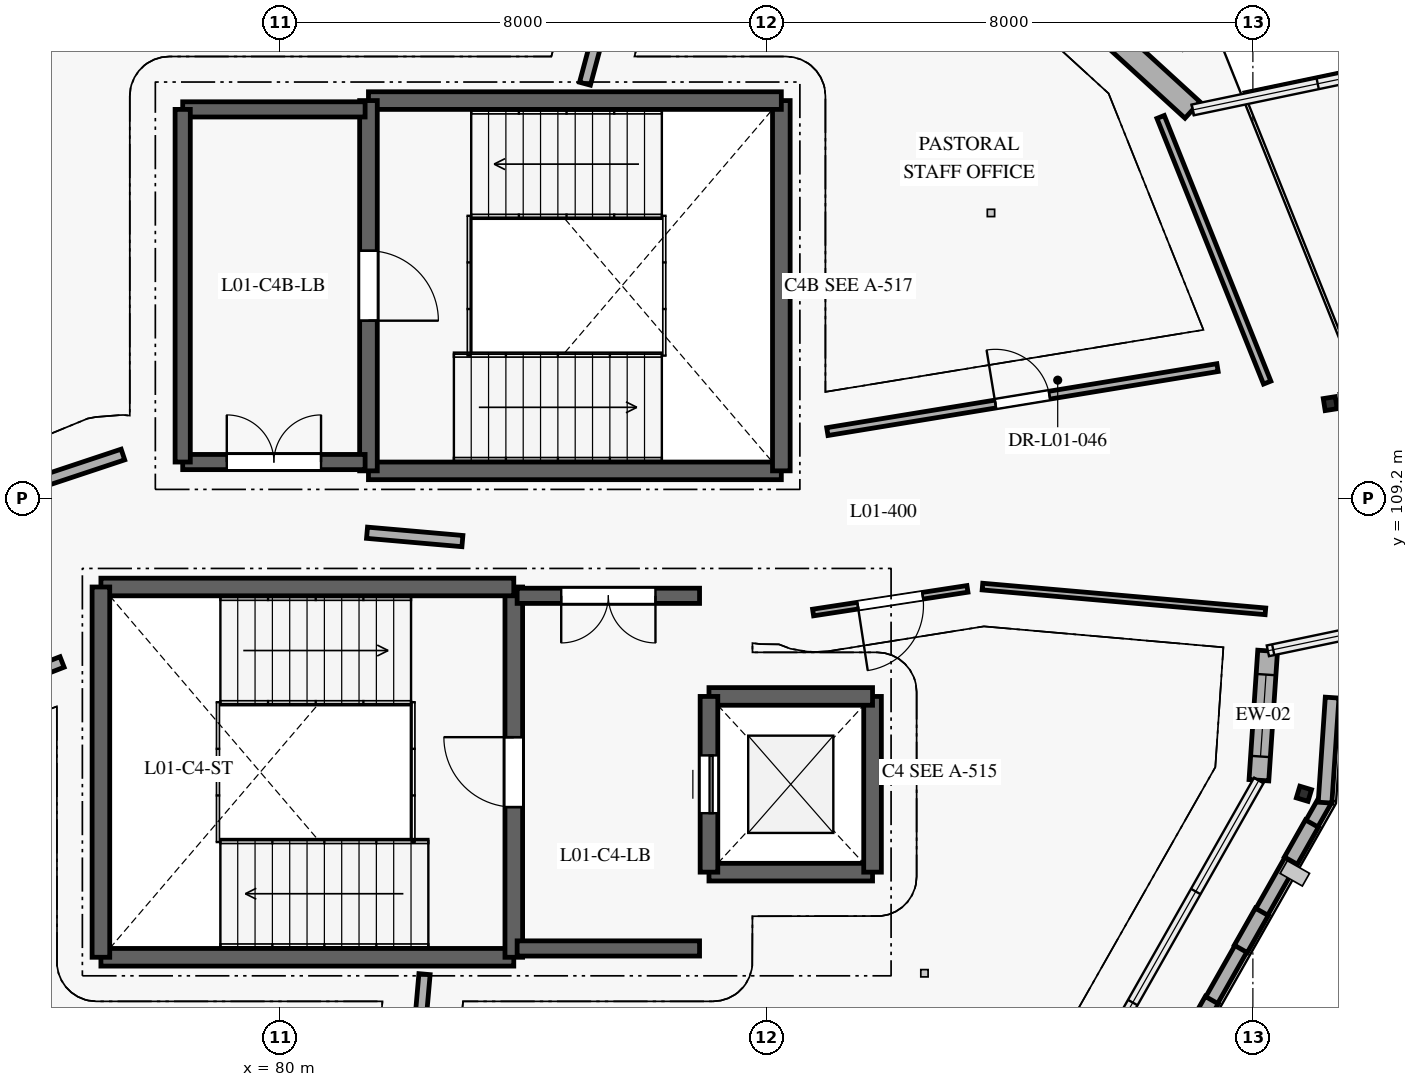
"""IFC4 building model, lengths in metres.
Left out: names, types, materials, properties, quantities, classifications, styles, units other than length and angle.
Written with IfcOpenShell. Run it as: python <this file> out.ifc"""

import sys

from ifc_helpers import new_model, si_unit, direction, frame, frame_2d, origin, origin_2d, place, context, subcontext, project, spatial, rectangle, hollow_rectangle, extrude, element, fill, save


model = new_model("IFC4")
c1 = context("Model", 3, precision=1e-05, world=origin(), true_north=direction((0.0, 1.0)))
c2 = subcontext(c1, "Body", "Model", "MODEL_VIEW")
j1 = project(units=[si_unit("LENGTHUNIT", "METRE"), si_unit("PLANEANGLEUNIT", "RADIAN")], contexts=[c1])
p1 = place(None, origin())
s1 = spatial("IfcSite", under=j1, at=p1, CompositionType="ELEMENT")
p2 = place(p1, origin())
s2 = spatial("IfcBuilding", under=s1, at=p2, CompositionType="ELEMENT")
p3 = place(p2, frame((0.0, 0.0, 4.2)))
s3 = spatial("IfcBuildingStorey", under=s2, at=p3, CompositionType="ELEMENT", Elevation=4.2)
for number, where, z_axis, x_axis in (
    (1, (97.272, 110.76, 0.0), (0.0, 0.0, 1.0), (-0.156, 0.988, 0.0)),
    (2, (96.84, 104.344, 0.0), (0.0, 0.0, 1.0), (0.288, 0.958, 0.0)),
):
    element("IfcColumn", number, at=place(p3, frame(where, z_axis=z_axis, x_axis=x_axis)), inside=s3, PredefinedType="COLUMN", context=c2, shape_type="SweptSolid", body=[
        extrude(hollow_rectangle(XDim=0.2, YDim=0.2, WallThickness=0.012, InnerFilletRadius=0.012, OuterFilletRadius=0.019, at=origin_2d()), origin(), (0.0, 0.0, 1.0), 4.2),
    ])
p4 = place(p3, frame((89.75, 120.396, 0.0), z_axis=(0.0, 0.0, 1.0), x_axis=(0.738102453677, -0.674688645136, 0.0)))
e3 = element("IfcWall", 3, at=p4, inside=s3, PredefinedType="SOLIDWALL", context=c2, shape_type="SweptSolid", body=[
    extrude(rectangle(XDim=7.122, YDim=0.365, at=frame_2d((3.561, 0.0))), origin(), (0.0, 0.0, 1.0), 3.94),
])
p5 = place(p4, frame((0.556, 0.0, 0.85)))
e4 = element("IfcOpeningElement", 4, at=p5, cuts=e3, PredefinedType="OPENING", context=c2, shape_type="SweptSolid", body=[
    extrude(rectangle(XDim=2.45, YDim=1.4, at=frame_2d((1.225, 0.7))), frame((0.0, 0.192, 0.0), z_axis=(0.0, -1.0, 0.0), x_axis=(1.0, 0.0, 0.0)), (0.0, 0.0, 1.0), 0.385),
])
p6 = place(p4, frame((3.911, 0.0, 0.85)))
e5 = element("IfcOpeningElement", 5, at=p6, cuts=e3, PredefinedType="OPENING", context=c2, shape_type="SweptSolid", body=[
    extrude(rectangle(XDim=0.85, YDim=1.4, at=frame_2d((0.425, 0.7))), frame((0.0, 0.192, 0.0), z_axis=(0.0, -1.0, 0.0), x_axis=(1.0, 0.0, 0.0)), (0.0, 0.0, 1.0), 0.385),
])
p7 = place(p3, frame((96.243, 106.695, 0.0), z_axis=(0.0, 0.0, 1.0), x_axis=(-0.067309145793, -0.997732167915, 0.0)))
e6 = element("IfcWall", 6, at=p7, inside=s3, PredefinedType="SOLIDWALL", context=c2, shape_type="SweptSolid", body=[
    extrude(rectangle(XDim=2.133, YDim=0.325, at=frame_2d((1.066, 0.0))), origin(), (0.0, 0.0, 1.0), 3.94),
])
p8 = place(p7, frame((0.391, 0.0, 0.85)))
e7 = element("IfcOpeningElement", 7, at=p8, cuts=e6, PredefinedType="OPENING", context=c2, shape_type="SweptSolid", body=[
    extrude(rectangle(XDim=1.35, YDim=1.6, at=frame_2d((0.675, 0.8))), frame((0.0, 0.172, 0.0), z_axis=(0.0, -1.0, 0.0), x_axis=(1.0, 0.0, 0.0)), (0.0, 0.0, 1.0), 0.345),
])
p9 = place(p3, frame((93.915, 98.469, 0.0), z_axis=(0.0, 0.0, 1.0), x_axis=(0.493497861667, 0.869747009498, 0.0)))
e8 = element("IfcWall", 8, at=p9, inside=s3, PredefinedType="ELEMENTEDWALL", context=c2, shape_type="SweptSolid", body=[
    extrude(rectangle(XDim=6.676, YDim=0.225, at=frame_2d((3.338, 0.0))), origin(), (0.0, 0.0, 1.0), 1.09),
])
for number, where, z_axis, x_axis in (
    (9, (94.978, 100.341, 1.09), (0.0, 0.0, 1.0), (0.493, 0.87, 0.0)),
    (10, (95.801, 101.793, 1.09), (0.0, 0.0, 1.0), (0.494, 0.87, 0.0)),
):
    element("IfcWall", number, at=place(p3, frame(where, z_axis=z_axis, x_axis=x_axis)), inside=s3, PredefinedType="ELEMENTEDWALL", context=c2, shape_type="SweptSolid", body=[
        extrude(rectangle(XDim=0.701, YDim=0.245, at=frame_2d((0.351, 0.0))), origin(), (0.0, 0.0, 1.0), 2.85),
    ])
p10 = place(p3, frame((96.625, 103.244, 1.09), z_axis=(0.0, 0.0, 1.0), x_axis=(0.49339908657, 0.869803047461, 0.0)))
e11 = element("IfcWall", 11, at=p10, inside=s3, PredefinedType="ELEMENTEDWALL", context=c2, shape_type="SweptSolid", body=[
    extrude(rectangle(XDim=0.701, YDim=0.245, at=frame_2d((0.351, 0.0))), origin(), (0.0, 0.0, 1.0), 2.85),
])
p11 = place(p3, frame((97.187, 104.198, 0.0), z_axis=(0.0, 0.0, 1.0), x_axis=(0.067258320943, 0.997735595368, 0.0)))
e12 = element("IfcWall", 12, at=p11, inside=s3, PredefinedType="ELEMENTEDWALL", context=c2, shape_type="SweptSolid", body=[
    extrude(rectangle(XDim=1.731, YDim=0.225, at=frame_2d((0.866, 0.0))), origin(), (0.0, 0.0, 1.0), 1.09),
])
p12 = place(p3, frame((77.055, 101.655, 0.0), z_axis=(0.0, 0.0, 1.0), x_axis=(1.0, 0.0, 0.0)))
e13 = element("IfcWall", 13, at=p12, inside=s3, PredefinedType="SHEAR", context=c2, shape_type="SweptSolid", body=[
    extrude(rectangle(XDim=6.79, YDim=0.29, at=frame_2d((3.395, 0.0))), origin(), (0.0, 0.0, 1.0), 3.95),
])
p13 = place(p3, frame((83.845, 101.655, 0.0), z_axis=(0.0, 0.0, 1.0), x_axis=(0.0, 1.0, 0.0)))
e14 = element("IfcWall", 14, at=p13, inside=s3, PredefinedType="SHEAR", context=c2, shape_type="SweptSolid", body=[
    extrude(rectangle(XDim=6.09, YDim=0.29, at=frame_2d((3.045, 0.0))), origin(), (0.0, 0.0, 1.0), 3.95),
])
p14 = place(p13, frame((2.47, 0.0, 0.0)))
e15 = element("IfcOpeningElement", 15, at=p14, cuts=e14, PredefinedType="OPENING", context=c2, shape_type="SweptSolid", body=[
    extrude(rectangle(XDim=1.15, YDim=2.1, at=frame_2d((0.575, 1.05))), frame((0.0, 0.155, 0.0), z_axis=(0.0, -1.0, 0.0), x_axis=(1.0, 0.0, 0.0)), (0.0, 0.0, 1.0), 0.31),
])
p15 = place(p3, frame((83.845, 107.745, 0.0), z_axis=(0.0, 0.0, 1.0), x_axis=(-1.0, 0.0, 0.0)))
e16 = element("IfcWall", 16, at=p15, inside=s3, PredefinedType="SHEAR", context=c2, shape_type="SweptSolid", body=[
    extrude(rectangle(XDim=6.79, YDim=0.29, at=frame_2d((3.395, 0.0))), origin(), (0.0, 0.0, 1.0), 3.95),
])
p16 = place(p3, frame((77.055, 107.745, 0.0), z_axis=(0.0, 0.0, 1.0), x_axis=(0.0, -1.0, 0.0)))
e17 = element("IfcWall", 17, at=p16, inside=s3, PredefinedType="SHEAR", context=c2, shape_type="SweptSolid", body=[
    extrude(rectangle(XDim=6.09, YDim=0.29, at=frame_2d((3.045, 0.0))), origin(), (0.0, 0.0, 1.0), 3.95),
])
p17 = place(p3, frame((87.055, 103.055, 0.0), z_axis=(0.0, 0.0, 1.0), x_axis=(1.0, 0.0, 0.0)))
e18 = element("IfcWall", 18, at=p17, inside=s3, PredefinedType="SHEAR", context=c2, shape_type="SweptSolid", body=[
    extrude(rectangle(XDim=2.69, YDim=0.29, at=frame_2d((1.345, 0.0))), origin(), (0.0, 0.0, 1.0), 3.95),
])
p18 = place(p3, frame((89.745, 103.055, 0.0), z_axis=(0.0, 0.0, 1.0), x_axis=(0.0, 1.0, 0.0)))
e19 = element("IfcWall", 19, at=p18, inside=s3, PredefinedType="SHEAR", context=c2, shape_type="SweptSolid", body=[
    extrude(rectangle(XDim=2.89, YDim=0.29, at=frame_2d((1.445, 0.0))), origin(), (0.0, 0.0, 1.0), 3.95),
])
p19 = place(p3, frame((89.745, 105.945, 0.0), z_axis=(0.0, 0.0, 1.0), x_axis=(-1.0, 0.0, 0.0)))
e20 = element("IfcWall", 20, at=p19, inside=s3, PredefinedType="SHEAR", context=c2, shape_type="SweptSolid", body=[
    extrude(rectangle(XDim=2.69, YDim=0.29, at=frame_2d((1.345, 0.0))), origin(), (0.0, 0.0, 1.0), 3.95),
])
p20 = place(p3, frame((87.055, 105.945, 0.0), z_axis=(0.0, 0.0, 1.0), x_axis=(0.0, -1.0, 0.0)))
e21 = element("IfcWall", 21, at=p20, inside=s3, PredefinedType="SHEAR", context=c2, shape_type="SweptSolid", body=[
    extrude(rectangle(XDim=2.89, YDim=0.29, at=frame_2d((1.445, 0.0))), origin(), (0.0, 0.0, 1.0), 3.95),
])
p21 = place(p20, frame((0.97, 0.0, 0.0)))
e22 = element("IfcOpeningElement", 22, at=p21, cuts=e21, PredefinedType="OPENING", context=c2, shape_type="SweptSolid", body=[
    extrude(rectangle(XDim=0.95, YDim=2.1, at=frame_2d((0.475, 1.05))), frame((0.0, 0.155, 0.0), z_axis=(0.0, -1.0, 0.0), x_axis=(1.0, 0.0, 0.0)), (0.0, 0.0, 1.0), 0.31),
])
p22 = place(p3, frame((83.9, 101.8, 0.0), z_axis=(0.0, 0.0, 1.0), x_axis=(1.0, 0.0, 0.0)))
e23 = element("IfcWall", 23, at=p22, inside=s3, PredefinedType="SHEAR", context=c2, shape_type="SweptSolid", body=[
    extrude(rectangle(XDim=3.0, YDim=0.25, at=frame_2d((1.5, 0.0))), origin(), (0.0, 0.0, 1.0), 3.95),
])
p23 = place(p3, frame((86.9, 107.6, 0.0), z_axis=(0.0, 0.0, 1.0), x_axis=(-1.0, 0.0, 0.0)))
e24 = element("IfcWall", 24, at=p23, inside=s3, PredefinedType="SHEAR", context=c2, shape_type="SweptSolid", body=[
    extrude(rectangle(XDim=3.0, YDim=0.25, at=frame_2d((1.5, 0.0))), origin(), (0.0, 0.0, 1.0), 3.95),
])
p24 = place(p23, frame((0.725, 0.0, 0.0)))
e25 = element("IfcOpeningElement", 25, at=p24, cuts=e24, PredefinedType="OPENING", context=c2, shape_type="SweptSolid", body=[
    extrude(rectangle(XDim=1.55, YDim=2.15, at=frame_2d((0.775, 1.075))), frame((0.0, 0.135, 0.0), z_axis=(0.0, -1.0, 0.0), x_axis=(1.0, 0.0, 0.0)), (0.0, 0.0, 1.0), 0.27),
])
p25 = place(p3, frame((81.455, 109.655, 0.0), z_axis=(0.0, 0.0, 1.0), x_axis=(1.0, 0.0, 0.0)))
e26 = element("IfcWall", 26, at=p25, inside=s3, PredefinedType="SHEAR", context=c2, shape_type="SweptSolid", body=[
    extrude(rectangle(XDim=6.79, YDim=0.29, at=frame_2d((3.395, 0.0))), origin(), (0.0, 0.0, 1.0), 3.95),
])
p26 = place(p3, frame((88.245, 109.655, 0.0), z_axis=(0.0, 0.0, 1.0), x_axis=(0.0, 1.0, 0.0)))
e27 = element("IfcWall", 27, at=p26, inside=s3, PredefinedType="SHEAR", context=c2, shape_type="SweptSolid", body=[
    extrude(rectangle(XDim=6.09, YDim=0.29, at=frame_2d((3.045, 0.0))), origin(), (0.0, 0.0, 1.0), 3.95),
])
p27 = place(p3, frame((88.245, 115.745, 0.0), z_axis=(0.0, 0.0, 1.0), x_axis=(-1.0, 0.0, 0.0)))
e28 = element("IfcWall", 28, at=p27, inside=s3, PredefinedType="SHEAR", context=c2, shape_type="SweptSolid", body=[
    extrude(rectangle(XDim=6.79, YDim=0.29, at=frame_2d((3.395, 0.0))), origin(), (0.0, 0.0, 1.0), 3.95),
])
p28 = place(p3, frame((81.455, 115.745, 0.0), z_axis=(0.0, 0.0, 1.0), x_axis=(0.0, -1.0, 0.0)))
e29 = element("IfcWall", 29, at=p28, inside=s3, PredefinedType="SHEAR", context=c2, shape_type="SweptSolid", body=[
    extrude(rectangle(XDim=6.09, YDim=0.29, at=frame_2d((3.045, 0.0))), origin(), (0.0, 0.0, 1.0), 3.95),
])
p29 = place(p28, frame((2.47, 0.0, 0.0)))
e30 = element("IfcOpeningElement", 30, at=p29, cuts=e29, PredefinedType="OPENING", context=c2, shape_type="SweptSolid", body=[
    extrude(rectangle(XDim=1.15, YDim=2.1, at=frame_2d((0.575, 1.05))), frame((0.0, 0.155, 0.0), z_axis=(0.0, -1.0, 0.0), x_axis=(1.0, 0.0, 0.0)), (0.0, 0.0, 1.0), 0.31),
])
p30 = place(p3, frame((78.4, 109.8, 0.0), z_axis=(0.0, 0.0, 1.0), x_axis=(1.0, 0.0, 0.0)))
e31 = element("IfcWall", 31, at=p30, inside=s3, PredefinedType="SHEAR", context=c2, shape_type="SweptSolid", body=[
    extrude(rectangle(XDim=3.0, YDim=0.25, at=frame_2d((1.5, 0.0))), origin(), (0.0, 0.0, 1.0), 3.95),
])
p31 = place(p30, frame((0.725, 0.0, 0.0)))
e32 = element("IfcOpeningElement", 32, at=p31, cuts=e31, PredefinedType="OPENING", context=c2, shape_type="SweptSolid", body=[
    extrude(rectangle(XDim=1.55, YDim=2.15, at=frame_2d((0.775, 1.075))), frame((0.0, 0.135, 0.0), z_axis=(0.0, -1.0, 0.0), x_axis=(1.0, 0.0, 0.0)), (0.0, 0.0, 1.0), 0.27),
])
p32 = place(p3, frame((81.4, 115.6, 0.0), z_axis=(0.0, 0.0, 1.0), x_axis=(-1.0, 0.0, 0.0)))
e33 = element("IfcWall", 33, at=p32, inside=s3, PredefinedType="SHEAR", context=c2, shape_type="SweptSolid", body=[
    extrude(rectangle(XDim=3.0, YDim=0.25, at=frame_2d((1.5, 0.0))), origin(), (0.0, 0.0, 1.0), 3.95),
])
p33 = place(p3, frame((78.4, 115.6, 0.0), z_axis=(0.0, 0.0, 1.0), x_axis=(0.0, -1.0, 0.0)))
e34 = element("IfcWall", 34, at=p33, inside=s3, PredefinedType="SHEAR", context=c2, shape_type="SweptSolid", body=[
    extrude(rectangle(XDim=5.8, YDim=0.25, at=frame_2d((2.9, 0.0))), origin(), (0.0, 0.0, 1.0), 3.95),
])
p34 = place(p3, frame((81.431, 108.637, 0.0), z_axis=(0.0, 0.0, 1.0), x_axis=(0.996196241539, -0.08713809926, 0.0)))
e35 = element("IfcWall", 35, at=p34, inside=s3, PredefinedType="PARTITIONING", context=c2, shape_type="SweptSolid", body=[
    extrude(rectangle(XDim=1.575, YDim=0.185, at=frame_2d((0.787, 0.0))), origin(), (0.0, 0.0, 1.0), 3.93),
])
p35 = place(p3, frame((85.016, 116.022, 0.0), z_axis=(0.0, 0.0, 1.0), x_axis=(0.25882188484, 0.965925065379, 0.0)))
e36 = element("IfcWall", 36, at=p35, inside=s3, PredefinedType="PARTITIONING", context=c2, shape_type="SweptSolid", body=[
    extrude(rectangle(XDim=5.452, YDim=0.185, at=frame_2d((2.726, 0.0))), origin(), (0.0, 0.0, 1.0), 3.93),
])
p36 = place(p35, frame((2.086, 0.0, 0.0)))
e37 = element("IfcOpeningElement", 37, at=p36, cuts=e36, PredefinedType="OPENING", context=c2, shape_type="SweptSolid", body=[
    extrude(rectangle(XDim=1.28, YDim=2.14, at=frame_2d((0.64, 1.07))), frame((0.0, 0.103, 0.0), z_axis=(0.0, -1.0, 0.0), x_axis=(1.0, 0.0, 0.0)), (0.0, 0.0, 1.0), 0.205),
])
p37 = place(p3, frame((75.427, 109.262, 0.0), z_axis=(0.0, 0.0, 1.0), x_axis=(0.948904309967, 0.315563956315, 0.0)))
e38 = element("IfcWall", 38, at=p37, inside=s3, PredefinedType="PARTITIONING", context=c2, shape_type="SweptSolid", body=[
    extrude(rectangle(XDim=2.097, YDim=0.185, at=frame_2d((1.048, 0.0))), origin(), (0.0, 0.0, 1.0), 3.93),
])
p38 = place(p3, frame((76.416, 106.512, 0.0), z_axis=(0.0, 0.0, 1.0), x_axis=(-0.931696873331, -0.363236749552, 0.0)))
e39 = element("IfcWall", 39, at=p38, inside=s3, PredefinedType="PARTITIONING", context=c2, shape_type="SweptSolid", body=[
    extrude(rectangle(XDim=5.663, YDim=0.185, at=frame_2d((2.831, 0.0))), origin(), (0.0, 0.0, 1.0), 3.93),
])
p39 = place(p3, frame((81.822, 95.036, 0.0), z_axis=(0.0, 0.0, 1.0), x_axis=(0.08717408664, 0.996193093039, 0.0)))
e40 = element("IfcWall", 40, at=p39, inside=s3, PredefinedType="PARTITIONING", context=c2, shape_type="SweptSolid", body=[
    extrude(rectangle(XDim=6.366, YDim=0.185, at=frame_2d((3.183, 0.0))), origin(), (0.0, 0.0, 1.0), 3.93),
])
p40 = place(p39, frame((2.503, 0.0, 0.0)))
e41 = element("IfcOpeningElement", 41, at=p40, cuts=e40, PredefinedType="OPENING", context=c2, shape_type="SweptSolid", body=[
    extrude(rectangle(XDim=1.36, YDim=2.14, at=frame_2d((0.68, 1.07))), frame((0.0, 0.103, 0.0), z_axis=(0.0, -1.0, 0.0), x_axis=(1.0, 0.0, 0.0)), (0.0, 0.0, 1.0), 0.205),
])
p41 = place(p3, frame((96.206, 107.344, 0.0), z_axis=(0.0, 0.0, 1.0), x_axis=(-0.996193377134, 0.087170840051, 0.0)))
e42 = element("IfcWall", 42, at=p41, inside=s3, PredefinedType="PARTITIONING", context=c2, shape_type="SweptSolid", body=[
    extrude(rectangle(XDim=4.672, YDim=0.11, at=frame_2d((2.336, 0.0))), origin(), (0.0, 0.0, 1.0), 3.93),
])
p42 = place(p3, frame((91.306, 107.714, 0.0), z_axis=(0.0, 0.0, 1.0), x_axis=(-0.988481340726, -0.151342786539, 0.0)))
e43 = element("IfcWall", 43, at=p42, inside=s3, PredefinedType="PARTITIONING", context=c2, shape_type="SweptSolid", body=[
    extrude(rectangle(XDim=2.568, YDim=0.11, at=frame_2d((1.284, 0.0))), origin(), (0.0, 0.0, 1.0), 3.93),
])
p43 = place(p42, frame((0.744, 0.0, 0.0)))
e44 = element("IfcOpeningElement", 44, at=p43, cuts=e43, PredefinedType="OPENING", context=c2, shape_type="SweptSolid", body=[
    extrude(rectangle(XDim=1.08, YDim=2.12, at=frame_2d((0.54, 1.06))), frame((0.0, 0.065, 0.0), z_axis=(0.0, -1.0, 0.0), x_axis=(1.0, 0.0, 0.0)), (0.0, 0.0, 1.0), 0.13),
])
p44 = place(p3, frame((89.002, 110.301, 0.0), z_axis=(0.0, 0.0, 1.0), x_axis=(0.986819802975, 0.161822978763, 0.0)))
e45 = element("IfcWall", 45, at=p44, inside=s3, PredefinedType="PARTITIONING", context=c2, shape_type="SweptSolid", body=[
    extrude(rectangle(XDim=6.502, YDim=0.13, at=frame_2d((3.251, 0.0))), origin(), (0.0, 0.0, 1.0), 3.93),
])
p45 = place(p44, frame((2.801, 0.0, 0.0)))
e46 = element("IfcOpeningElement", 46, at=p45, cuts=e45, PredefinedType="OPENING", context=c2, shape_type="SweptSolid", body=[
    extrude(rectangle(XDim=0.9, YDim=2.05, at=frame_2d((0.45, 1.025))), frame((0.0, 0.075, 0.0), z_axis=(0.0, -1.0, 0.0), x_axis=(1.0, 0.0, 0.0)), (0.0, 0.0, 1.0), 0.15),
])
p46 = place(p3, frame((96.235, 111.106, 0.0), z_axis=(0.0, 0.0, 1.0), x_axis=(-0.37231147683, 0.928107840835, 0.0)))
e47 = element("IfcWall", 47, at=p46, inside=s3, PredefinedType="PARTITIONING", context=c2, shape_type="SweptSolid", body=[
    extrude(rectangle(XDim=4.708, YDim=0.13, at=frame_2d((2.354, 0.0))), origin(), (0.0, 0.0, 1.0), 3.93),
])
p47 = place(p8, origin())
e48 = element("IfcWindow", 48, at=p47, inside=s3, PartitioningType="SINGLE_PANEL", PredefinedType="WINDOW", context=c2, shape_type="SweptSolid", body=[
    extrude(rectangle(XDim=1.35, YDim=1.6, at=frame_2d((0.675, 0.8))), frame((0.0, 0.03, 0.0), z_axis=(0.0, -1.0, 0.0), x_axis=(1.0, 0.0, 0.0)), (0.0, 0.0, 1.0), 0.06),
])
fill(e7, e48)
p48 = place(p14, origin())
e49 = element("IfcDoor", 49, at=p48, inside=s3, OperationType="SINGLE_SWING_RIGHT", PredefinedType="DOOR", context=c2, shape_type="SweptSolid", body=[
    extrude(rectangle(XDim=1.15, YDim=2.1, at=frame_2d((0.575, 1.05))), frame((0.0, 0.025, 0.0), z_axis=(0.0, -1.0, 0.0), x_axis=(1.0, 0.0, 0.0)), (0.0, 0.0, 1.0), 0.05),
])
fill(e15, e49)
p49 = place(p21, frame((0.95, 0.0, 0.0), z_axis=(0.0, 0.0, 1.0), x_axis=(-1.0, 0.0, 0.0)))
e50 = element("IfcDoor", 50, at=p49, inside=s3, OperationType="SLIDING_TO_LEFT", PredefinedType="DOOR", context=c2, shape_type="SweptSolid", body=[
    extrude(rectangle(XDim=0.95, YDim=2.1, at=frame_2d((0.475, 1.05))), frame((0.0, 0.025, 0.0), z_axis=(0.0, -1.0, 0.0), x_axis=(1.0, 0.0, 0.0)), (0.0, 0.0, 1.0), 0.05),
])
fill(e22, e50)
p50 = place(p24, origin())
e51 = element("IfcDoor", 51, at=p50, inside=s3, OperationType="DOUBLE_DOOR_SINGLE_SWING", PredefinedType="DOOR", context=c2, shape_type="SweptSolid", body=[
    extrude(rectangle(XDim=1.55, YDim=2.15, at=frame_2d((0.775, 1.075))), frame((0.0, 0.025, 0.0), z_axis=(0.0, -1.0, 0.0), x_axis=(1.0, 0.0, 0.0)), (0.0, 0.0, 1.0), 0.05),
])
fill(e25, e51)
p51 = place(p29, origin())
e52 = element("IfcDoor", 52, at=p51, inside=s3, OperationType="SINGLE_SWING_RIGHT", PredefinedType="DOOR", context=c2, shape_type="SweptSolid", body=[
    extrude(rectangle(XDim=1.15, YDim=2.1, at=frame_2d((0.575, 1.05))), frame((0.0, 0.025, 0.0), z_axis=(0.0, -1.0, 0.0), x_axis=(1.0, 0.0, 0.0)), (0.0, 0.0, 1.0), 0.05),
])
fill(e30, e52)
p52 = place(p31, origin())
e53 = element("IfcDoor", 53, at=p52, inside=s3, OperationType="DOUBLE_DOOR_SINGLE_SWING", PredefinedType="DOOR", context=c2, shape_type="SweptSolid", body=[
    extrude(rectangle(XDim=1.55, YDim=2.15, at=frame_2d((0.775, 1.075))), frame((0.0, 0.025, 0.0), z_axis=(0.0, -1.0, 0.0), x_axis=(1.0, 0.0, 0.0)), (0.0, 0.0, 1.0), 0.05),
])
fill(e32, e53)
p53 = place(p43, origin())
e54 = element("IfcDoor", 54, at=p53, inside=s3, OperationType="SINGLE_SWING_RIGHT", PredefinedType="DOOR", context=c2, shape_type="SweptSolid", body=[
    extrude(rectangle(XDim=1.08, YDim=2.12, at=frame_2d((0.54, 1.06))), frame((0.0, 0.025, 0.0), z_axis=(0.0, -1.0, 0.0), x_axis=(1.0, 0.0, 0.0)), (0.0, 0.0, 1.0), 0.05),
])
fill(e44, e54)
p54 = place(p45, origin())
e55 = element("IfcDoor", 55, at=p54, inside=s3, OperationType="SINGLE_SWING_LEFT", PredefinedType="DOOR", context=c2, shape_type="SweptSolid", body=[
    extrude(rectangle(XDim=0.9, YDim=2.05, at=frame_2d((0.45, 1.025))), frame((0.0, 0.025, 0.0), z_axis=(0.0, -1.0, 0.0), x_axis=(1.0, 0.0, 0.0)), (0.0, 0.0, 1.0), 0.05),
])
fill(e46, e55)
save(model, sys.argv[1])
